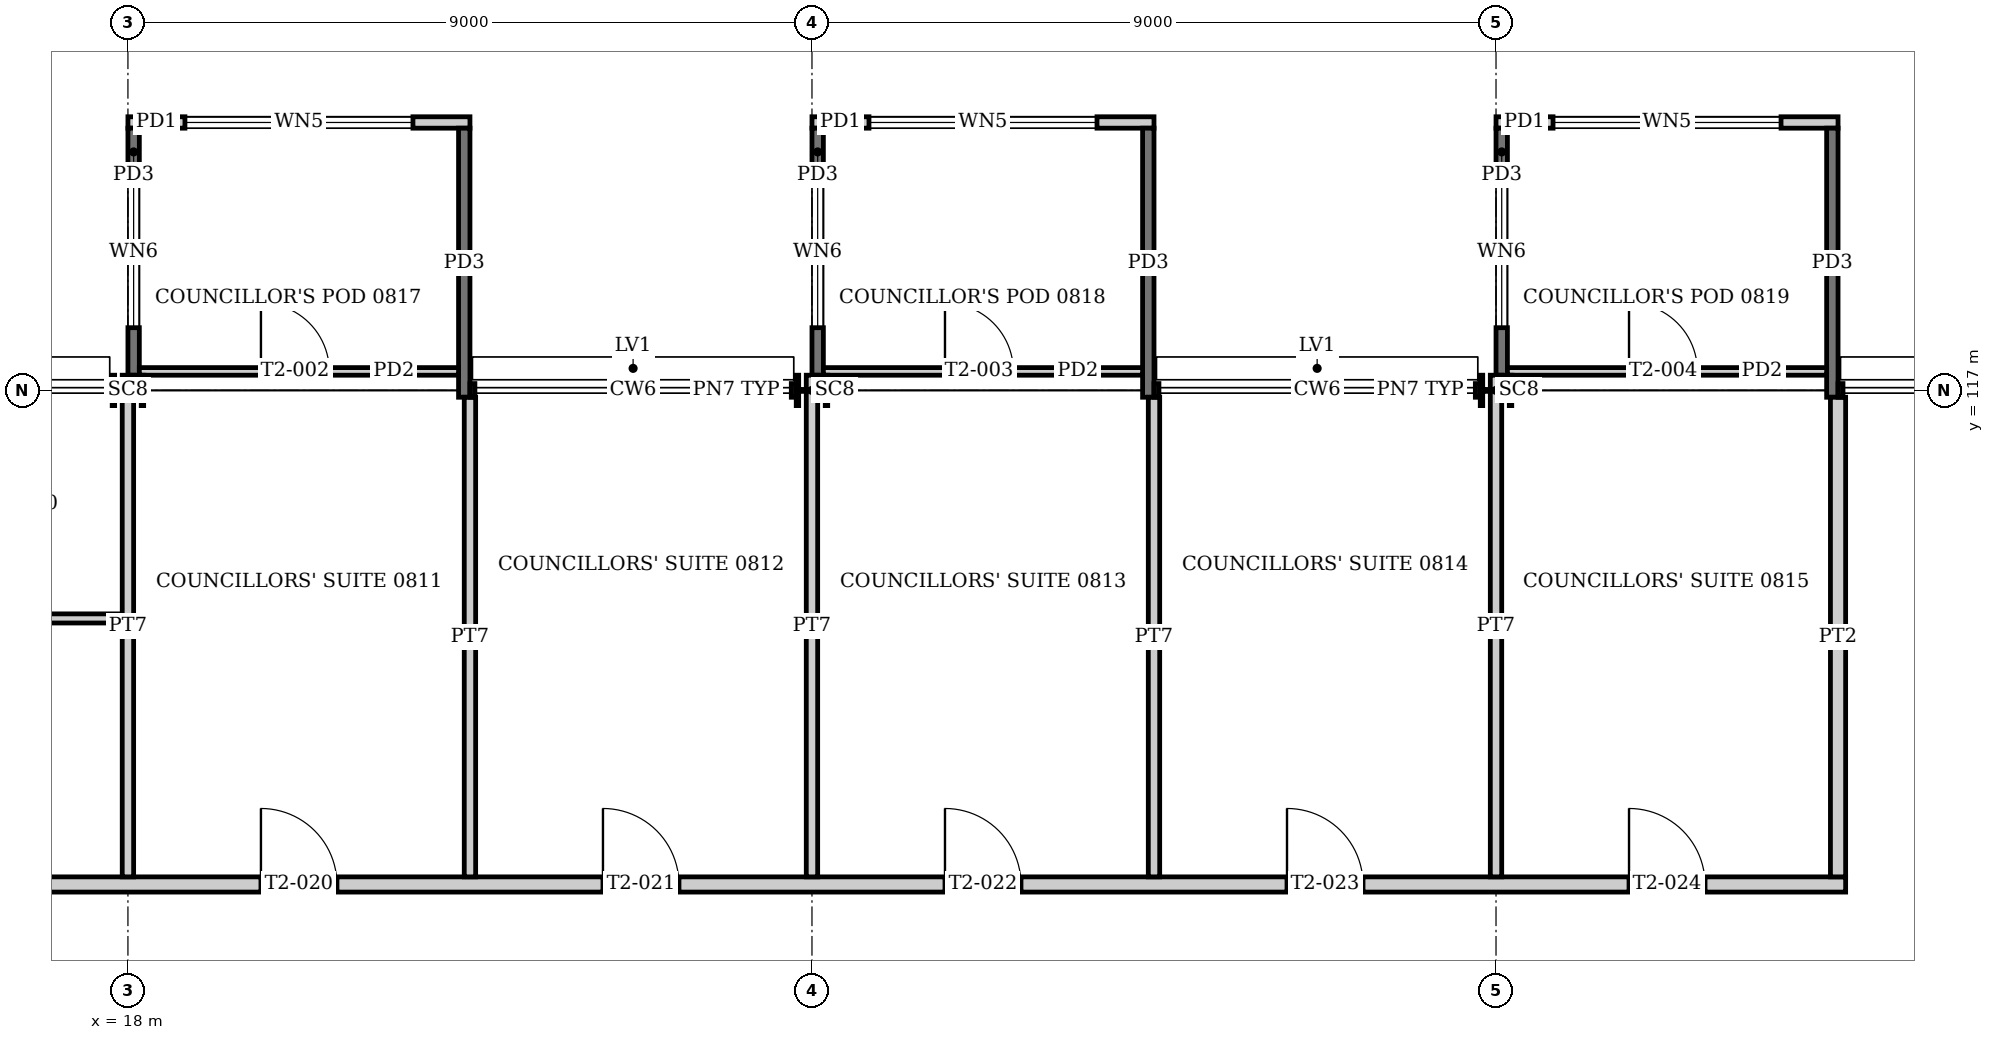
"""IFC4 building model, lengths in metres.
Left out: names, types, materials, properties, quantities, classifications, styles, units other than length and angle.
Written with IfcOpenShell. Run it as: python <this file> out.ifc"""

import sys

from ifc_helpers import new_model, si_unit, direction, frame, frame_2d, origin, origin_2d, place, context, subcontext, project, spatial, rectangle, i_section, extrude, element, fill, save


model = new_model("IFC4")
c1 = context("Model", 3, precision=1e-05, world=origin(), true_north=direction((0.0, 1.0)))
c2 = subcontext(c1, "Body", "Model", "MODEL_VIEW")
j1 = project(units=[si_unit("LENGTHUNIT", "METRE"), si_unit("PLANEANGLEUNIT", "RADIAN")], contexts=[c1])
p1 = place(None, origin())
s1 = spatial("IfcSite", under=j1, at=p1, CompositionType="ELEMENT")
p2 = place(p1, origin())
s2 = spatial("IfcBuilding", under=s1, at=p2, CompositionType="ELEMENT")
p3 = place(p2, frame((0.0, 0.0, 35.2)))
s3 = spatial("IfcBuildingStorey", under=s2, at=p3, CompositionType="ELEMENT", Elevation=35.2)
for number, where, z_axis, x_axis in (
    (1, (18.0, 117.0, 0.0), (0.0, 0.0, 1.0), (0.0, 1.0, 0.0)),
    (2, (27.0, 117.0, 0.0), (0.0, 0.0, 1.0), (0.0, 1.0, 0.0)),
    (3, (36.0, 117.0, 0.0), (0.0, 0.0, 1.0), (0.0, 1.0, 0.0)),
):
    element("IfcColumn", number, at=place(p3, frame(where, z_axis=z_axis, x_axis=x_axis)), inside=s3, PredefinedType="COLUMN", context=c2, shape_type="SweptSolid", body=[
        extrude(i_section(OverallWidth=0.4, OverallDepth=0.414, WebThickness=0.025, FlangeThickness=0.032, at=origin_2d()), origin(), (0.0, 0.0, 1.0), 4.0),
    ])
p4 = place(p3, frame((18.0, 120.525, 0.0), z_axis=(0.0, 0.0, 1.0), x_axis=(1.0, 0.0, 0.0)))
e4 = element("IfcWall", 4, at=p4, inside=s3, PredefinedType="SOLIDWALL", context=c2, shape_type="SweptSolid", body=[
    extrude(rectangle(XDim=4.5, YDim=0.15, at=frame_2d((2.25, 0.0))), origin(), (0.0, 0.0, 1.0), 2.6),
])
p5 = place(p4, frame((0.75, 0.0, 0.9)))
e5 = element("IfcOpeningElement", 5, at=p5, cuts=e4, PredefinedType="OPENING", context=c2, shape_type="SweptSolid", body=[
    extrude(rectangle(XDim=3.0, YDim=1.4, at=frame_2d((1.5, 0.7))), frame((0.0, 0.085, 0.0), z_axis=(0.0, -1.0, 0.0), x_axis=(1.0, 0.0, 0.0)), (0.0, 0.0, 1.0), 0.17),
])
p6 = place(p3, frame((18.075, 120.45, -0.15), z_axis=(0.0, 0.0, 1.0), x_axis=(0.0, -1.0, 0.0)))
e6 = element("IfcWall", 6, at=p6, inside=s3, PredefinedType="SOLIDWALL", context=c2, shape_type="SweptSolid", body=[
    extrude(rectangle(XDim=3.25, YDim=0.15, at=frame_2d((1.625, 0.0))), origin(), (0.0, 0.0, 1.0), 2.75),
])
p7 = place(p6, frame((0.625, 0.0, 1.05)))
e7 = element("IfcOpeningElement", 7, at=p7, cuts=e6, PredefinedType="OPENING", context=c2, shape_type="SweptSolid", body=[
    extrude(rectangle(XDim=2.0, YDim=1.4, at=frame_2d((1.0, 0.7))), frame((0.0, 0.085, 0.0), z_axis=(0.0, -1.0, 0.0), x_axis=(1.0, 0.0, 0.0)), (0.0, 0.0, 1.0), 0.17),
])
p8 = place(p3, frame((22.425, 120.45, -0.15), z_axis=(0.0, 0.0, 1.0), x_axis=(0.0, -1.0, 0.0)))
e8 = element("IfcWall", 8, at=p8, inside=s3, PredefinedType="SOLIDWALL", context=c2, shape_type="SweptSolid", body=[
    extrude(rectangle(XDim=3.54, YDim=0.15, at=frame_2d((1.77, 0.0))), origin(), (0.0, 0.0, 1.0), 2.75),
])
p9 = place(p3, frame((18.15, 117.25, 0.0), z_axis=(0.0, 0.0, 1.0), x_axis=(1.0, 0.0, 0.0)))
e9 = element("IfcWall", 9, at=p9, inside=s3, PredefinedType="PARTITIONING", context=c2, shape_type="SweptSolid", body=[
    extrude(rectangle(XDim=4.2, YDim=0.1, at=frame_2d((2.1, 0.0))), origin(), (0.0, 0.0, 1.0), 2.6),
])
p10 = place(p9, frame((1.6, 0.0, 0.0)))
e10 = element("IfcOpeningElement", 10, at=p10, cuts=e9, PredefinedType="OPENING", context=c2, shape_type="SweptSolid", body=[
    extrude(rectangle(XDim=0.9, YDim=2.1, at=frame_2d((0.45, 1.05))), frame((0.0, 0.06, 0.0), z_axis=(0.0, -1.0, 0.0), x_axis=(1.0, 0.0, 0.0)), (0.0, 0.0, 1.0), 0.12),
])
p11 = place(p3, frame((27.0, 120.525, 0.0), z_axis=(0.0, 0.0, 1.0), x_axis=(1.0, 0.0, 0.0)))
e11 = element("IfcWall", 11, at=p11, inside=s3, PredefinedType="SOLIDWALL", context=c2, shape_type="SweptSolid", body=[
    extrude(rectangle(XDim=4.5, YDim=0.15, at=frame_2d((2.25, 0.0))), origin(), (0.0, 0.0, 1.0), 2.6),
])
p12 = place(p11, frame((0.75, 0.0, 0.9)))
e12 = element("IfcOpeningElement", 12, at=p12, cuts=e11, PredefinedType="OPENING", context=c2, shape_type="SweptSolid", body=[
    extrude(rectangle(XDim=3.0, YDim=1.4, at=frame_2d((1.5, 0.7))), frame((0.0, 0.085, 0.0), z_axis=(0.0, -1.0, 0.0), x_axis=(1.0, 0.0, 0.0)), (0.0, 0.0, 1.0), 0.17),
])
p13 = place(p3, frame((27.075, 120.45, -0.15), z_axis=(0.0, 0.0, 1.0), x_axis=(0.0, -1.0, 0.0)))
e13 = element("IfcWall", 13, at=p13, inside=s3, PredefinedType="SOLIDWALL", context=c2, shape_type="SweptSolid", body=[
    extrude(rectangle(XDim=3.25, YDim=0.15, at=frame_2d((1.625, 0.0))), origin(), (0.0, 0.0, 1.0), 2.75),
])
p14 = place(p13, frame((0.625, 0.0, 1.05)))
e14 = element("IfcOpeningElement", 14, at=p14, cuts=e13, PredefinedType="OPENING", context=c2, shape_type="SweptSolid", body=[
    extrude(rectangle(XDim=2.0, YDim=1.4, at=frame_2d((1.0, 0.7))), frame((0.0, 0.085, 0.0), z_axis=(0.0, -1.0, 0.0), x_axis=(1.0, 0.0, 0.0)), (0.0, 0.0, 1.0), 0.17),
])
p15 = place(p3, frame((31.425, 120.45, -0.15), z_axis=(0.0, 0.0, 1.0), x_axis=(0.0, -1.0, 0.0)))
e15 = element("IfcWall", 15, at=p15, inside=s3, PredefinedType="SOLIDWALL", context=c2, shape_type="SweptSolid", body=[
    extrude(rectangle(XDim=3.54, YDim=0.15, at=frame_2d((1.77, 0.0))), origin(), (0.0, 0.0, 1.0), 2.75),
])
p16 = place(p3, frame((27.15, 117.25, 0.0), z_axis=(0.0, 0.0, 1.0), x_axis=(1.0, 0.0, 0.0)))
e16 = element("IfcWall", 16, at=p16, inside=s3, PredefinedType="PARTITIONING", context=c2, shape_type="SweptSolid", body=[
    extrude(rectangle(XDim=4.2, YDim=0.1, at=frame_2d((2.1, 0.0))), origin(), (0.0, 0.0, 1.0), 2.6),
])
p17 = place(p16, frame((1.6, 0.0, 0.0)))
e17 = element("IfcOpeningElement", 17, at=p17, cuts=e16, PredefinedType="OPENING", context=c2, shape_type="SweptSolid", body=[
    extrude(rectangle(XDim=0.9, YDim=2.1, at=frame_2d((0.45, 1.05))), frame((0.0, 0.06, 0.0), z_axis=(0.0, -1.0, 0.0), x_axis=(1.0, 0.0, 0.0)), (0.0, 0.0, 1.0), 0.12),
])
p18 = place(p3, frame((36.0, 120.525, 0.0), z_axis=(0.0, 0.0, 1.0), x_axis=(1.0, 0.0, 0.0)))
e18 = element("IfcWall", 18, at=p18, inside=s3, PredefinedType="SOLIDWALL", context=c2, shape_type="SweptSolid", body=[
    extrude(rectangle(XDim=4.5, YDim=0.15, at=frame_2d((2.25, 0.0))), origin(), (0.0, 0.0, 1.0), 2.6),
])
p19 = place(p18, frame((0.75, 0.0, 0.9)))
e19 = element("IfcOpeningElement", 19, at=p19, cuts=e18, PredefinedType="OPENING", context=c2, shape_type="SweptSolid", body=[
    extrude(rectangle(XDim=3.0, YDim=1.4, at=frame_2d((1.5, 0.7))), frame((0.0, 0.085, 0.0), z_axis=(0.0, -1.0, 0.0), x_axis=(1.0, 0.0, 0.0)), (0.0, 0.0, 1.0), 0.17),
])
p20 = place(p3, frame((36.075, 120.45, -0.15), z_axis=(0.0, 0.0, 1.0), x_axis=(0.0, -1.0, 0.0)))
e20 = element("IfcWall", 20, at=p20, inside=s3, PredefinedType="SOLIDWALL", context=c2, shape_type="SweptSolid", body=[
    extrude(rectangle(XDim=3.25, YDim=0.15, at=frame_2d((1.625, 0.0))), origin(), (0.0, 0.0, 1.0), 2.75),
])
p21 = place(p20, frame((0.625, 0.0, 1.05)))
e21 = element("IfcOpeningElement", 21, at=p21, cuts=e20, PredefinedType="OPENING", context=c2, shape_type="SweptSolid", body=[
    extrude(rectangle(XDim=2.0, YDim=1.4, at=frame_2d((1.0, 0.7))), frame((0.0, 0.085, 0.0), z_axis=(0.0, -1.0, 0.0), x_axis=(1.0, 0.0, 0.0)), (0.0, 0.0, 1.0), 0.17),
])
p22 = place(p3, frame((40.425, 120.45, -0.15), z_axis=(0.0, 0.0, 1.0), x_axis=(0.0, -1.0, 0.0)))
e22 = element("IfcWall", 22, at=p22, inside=s3, PredefinedType="SOLIDWALL", context=c2, shape_type="SweptSolid", body=[
    extrude(rectangle(XDim=3.54, YDim=0.15, at=frame_2d((1.77, 0.0))), origin(), (0.0, 0.0, 1.0), 2.75),
])
p23 = place(p3, frame((36.15, 117.25, 0.0), z_axis=(0.0, 0.0, 1.0), x_axis=(1.0, 0.0, 0.0)))
e23 = element("IfcWall", 23, at=p23, inside=s3, PredefinedType="PARTITIONING", context=c2, shape_type="SweptSolid", body=[
    extrude(rectangle(XDim=4.2, YDim=0.1, at=frame_2d((2.1, 0.0))), origin(), (0.0, 0.0, 1.0), 2.6),
])
p24 = place(p23, frame((1.6, 0.0, 0.0)))
e24 = element("IfcOpeningElement", 24, at=p24, cuts=e23, PredefinedType="OPENING", context=c2, shape_type="SweptSolid", body=[
    extrude(rectangle(XDim=0.9, YDim=2.1, at=frame_2d((0.45, 1.05))), frame((0.0, 0.06, 0.0), z_axis=(0.0, -1.0, 0.0), x_axis=(1.0, 0.0, 0.0)), (0.0, 0.0, 1.0), 0.12),
])
p25 = place(p3, frame((13.4, 110.5, 0.0), z_axis=(0.0, 0.0, 1.0), x_axis=(1.0, 0.0, 0.0)))
e25 = element("IfcWall", 25, at=p25, inside=s3, PredefinedType="PARTITIONING", context=c2, shape_type="SweptSolid", body=[
    extrude(rectangle(XDim=27.2, YDim=0.2, at=frame_2d((13.6, 0.0))), origin(), (0.0, 0.0, 1.0), 3.05),
])
p26 = place(p25, frame((6.35, 0.0, 0.0)))
e26 = element("IfcOpeningElement", 26, at=p26, cuts=e25, PredefinedType="OPENING", context=c2, shape_type="SweptSolid", body=[
    extrude(rectangle(XDim=1.0, YDim=2.1, at=frame_2d((0.5, 1.05))), frame((0.0, 0.11, 0.0), z_axis=(0.0, -1.0, 0.0), x_axis=(1.0, 0.0, 0.0)), (0.0, 0.0, 1.0), 0.22),
])
p27 = place(p25, frame((10.85, 0.0, 0.0)))
e27 = element("IfcOpeningElement", 27, at=p27, cuts=e25, PredefinedType="OPENING", context=c2, shape_type="SweptSolid", body=[
    extrude(rectangle(XDim=1.0, YDim=2.1, at=frame_2d((0.5, 1.05))), frame((0.0, 0.11, 0.0), z_axis=(0.0, -1.0, 0.0), x_axis=(1.0, 0.0, 0.0)), (0.0, 0.0, 1.0), 0.22),
])
p28 = place(p25, frame((15.35, 0.0, 0.0)))
e28 = element("IfcOpeningElement", 28, at=p28, cuts=e25, PredefinedType="OPENING", context=c2, shape_type="SweptSolid", body=[
    extrude(rectangle(XDim=1.0, YDim=2.1, at=frame_2d((0.5, 1.05))), frame((0.0, 0.11, 0.0), z_axis=(0.0, -1.0, 0.0), x_axis=(1.0, 0.0, 0.0)), (0.0, 0.0, 1.0), 0.22),
])
p29 = place(p25, frame((19.85, 0.0, 0.0)))
e29 = element("IfcOpeningElement", 29, at=p29, cuts=e25, PredefinedType="OPENING", context=c2, shape_type="SweptSolid", body=[
    extrude(rectangle(XDim=1.0, YDim=2.1, at=frame_2d((0.5, 1.05))), frame((0.0, 0.11, 0.0), z_axis=(0.0, -1.0, 0.0), x_axis=(1.0, 0.0, 0.0)), (0.0, 0.0, 1.0), 0.22),
])
p30 = place(p25, frame((24.35, 0.0, 0.0)))
e30 = element("IfcOpeningElement", 30, at=p30, cuts=e25, PredefinedType="OPENING", context=c2, shape_type="SweptSolid", body=[
    extrude(rectangle(XDim=1.0, YDim=2.1, at=frame_2d((0.5, 1.05))), frame((0.0, 0.11, 0.0), z_axis=(0.0, -1.0, 0.0), x_axis=(1.0, 0.0, 0.0)), (0.0, 0.0, 1.0), 0.22),
])
p31 = place(p3, frame((13.6, 114.0, 0.0), z_axis=(0.0, 0.0, 1.0), x_axis=(1.0, 0.0, 0.0)))
e31 = element("IfcWall", 31, at=p31, inside=s3, PredefinedType="PARTITIONING", context=c2, shape_type="SweptSolid", body=[
    extrude(rectangle(XDim=4.325, YDim=0.12, at=frame_2d((2.163, 0.0))), origin(), (0.0, 0.0, 1.0), 3.05),
])
p32 = place(p3, frame((18.0, 110.6, 0.0), z_axis=(0.0, 0.0, 1.0), x_axis=(0.0, 1.0, 0.0)))
e32 = element("IfcWall", 32, at=p32, inside=s3, PredefinedType="PARTITIONING", context=c2, shape_type="SweptSolid", body=[
    extrude(rectangle(XDim=6.6, YDim=0.15, at=frame_2d((3.3, 0.0))), origin(), (0.0, 0.0, 1.0), 3.05),
])
p33 = place(p3, frame((22.5, 110.6, 0.0), z_axis=(0.0, 0.0, 1.0), x_axis=(0.0, 1.0, 0.0)))
e33 = element("IfcWall", 33, at=p33, inside=s3, PredefinedType="PARTITIONING", context=c2, shape_type="SweptSolid", body=[
    extrude(rectangle(XDim=6.31, YDim=0.15, at=frame_2d((3.155, 0.0))), origin(), (0.0, 0.0, 1.0), 3.05),
])
p34 = place(p3, frame((27.0, 110.6, 0.0), z_axis=(0.0, 0.0, 1.0), x_axis=(0.0, 1.0, 0.0)))
e34 = element("IfcWall", 34, at=p34, inside=s3, PredefinedType="PARTITIONING", context=c2, shape_type="SweptSolid", body=[
    extrude(rectangle(XDim=6.6, YDim=0.15, at=frame_2d((3.3, 0.0))), origin(), (0.0, 0.0, 1.0), 3.05),
])
p35 = place(p3, frame((31.5, 110.6, 0.0), z_axis=(0.0, 0.0, 1.0), x_axis=(0.0, 1.0, 0.0)))
e35 = element("IfcWall", 35, at=p35, inside=s3, PredefinedType="PARTITIONING", context=c2, shape_type="SweptSolid", body=[
    extrude(rectangle(XDim=6.31, YDim=0.15, at=frame_2d((3.155, 0.0))), origin(), (0.0, 0.0, 1.0), 3.05),
])
p36 = place(p3, frame((36.0, 110.6, 0.0), z_axis=(0.0, 0.0, 1.0), x_axis=(0.0, 1.0, 0.0)))
e36 = element("IfcWall", 36, at=p36, inside=s3, PredefinedType="PARTITIONING", context=c2, shape_type="SweptSolid", body=[
    extrude(rectangle(XDim=6.6, YDim=0.15, at=frame_2d((3.3, 0.0))), origin(), (0.0, 0.0, 1.0), 3.05),
])
p37 = place(p3, frame((40.5, 110.6, 0.0), z_axis=(0.0, 0.0, 1.0), x_axis=(0.0, 1.0, 0.0)))
e37 = element("IfcWall", 37, at=p37, inside=s3, PredefinedType="PARTITIONING", context=c2, shape_type="SweptSolid", body=[
    extrude(rectangle(XDim=6.31, YDim=0.2, at=frame_2d((3.155, 0.0))), origin(), (0.0, 0.0, 1.0), 3.05),
])
p38 = place(p5, origin())
e38 = element("IfcWindow", 38, at=p38, inside=s3, PartitioningType="SINGLE_PANEL", PredefinedType="WINDOW", context=c2, shape_type="SweptSolid", body=[
    extrude(rectangle(XDim=3.0, YDim=1.4, at=frame_2d((1.5, 0.7))), frame((0.0, 0.03, 0.0), z_axis=(0.0, -1.0, 0.0), x_axis=(1.0, 0.0, 0.0)), (0.0, 0.0, 1.0), 0.06),
])
fill(e5, e38)
p39 = place(p7, origin())
e39 = element("IfcWindow", 39, at=p39, inside=s3, PartitioningType="SINGLE_PANEL", PredefinedType="WINDOW", context=c2, shape_type="SweptSolid", body=[
    extrude(rectangle(XDim=2.0, YDim=1.4, at=frame_2d((1.0, 0.7))), frame((0.0, 0.03, 0.0), z_axis=(0.0, -1.0, 0.0), x_axis=(1.0, 0.0, 0.0)), (0.0, 0.0, 1.0), 0.06),
])
fill(e7, e39)
p40 = place(p10, origin())
e40 = element("IfcDoor", 40, at=p40, inside=s3, OperationType="SINGLE_SWING_LEFT", PredefinedType="DOOR", context=c2, shape_type="SweptSolid", body=[
    extrude(rectangle(XDim=0.9, YDim=2.1, at=frame_2d((0.45, 1.05))), frame((0.0, 0.025, 0.0), z_axis=(0.0, -1.0, 0.0), x_axis=(1.0, 0.0, 0.0)), (0.0, 0.0, 1.0), 0.05),
])
fill(e10, e40)
p41 = place(p12, origin())
e41 = element("IfcWindow", 41, at=p41, inside=s3, PartitioningType="SINGLE_PANEL", PredefinedType="WINDOW", context=c2, shape_type="SweptSolid", body=[
    extrude(rectangle(XDim=3.0, YDim=1.4, at=frame_2d((1.5, 0.7))), frame((0.0, 0.03, 0.0), z_axis=(0.0, -1.0, 0.0), x_axis=(1.0, 0.0, 0.0)), (0.0, 0.0, 1.0), 0.06),
])
fill(e12, e41)
p42 = place(p14, origin())
e42 = element("IfcWindow", 42, at=p42, inside=s3, PartitioningType="SINGLE_PANEL", PredefinedType="WINDOW", context=c2, shape_type="SweptSolid", body=[
    extrude(rectangle(XDim=2.0, YDim=1.4, at=frame_2d((1.0, 0.7))), frame((0.0, 0.03, 0.0), z_axis=(0.0, -1.0, 0.0), x_axis=(1.0, 0.0, 0.0)), (0.0, 0.0, 1.0), 0.06),
])
fill(e14, e42)
p43 = place(p17, origin())
e43 = element("IfcDoor", 43, at=p43, inside=s3, OperationType="SINGLE_SWING_LEFT", PredefinedType="DOOR", context=c2, shape_type="SweptSolid", body=[
    extrude(rectangle(XDim=0.9, YDim=2.1, at=frame_2d((0.45, 1.05))), frame((0.0, 0.025, 0.0), z_axis=(0.0, -1.0, 0.0), x_axis=(1.0, 0.0, 0.0)), (0.0, 0.0, 1.0), 0.05),
])
fill(e17, e43)
p44 = place(p19, origin())
e44 = element("IfcWindow", 44, at=p44, inside=s3, PartitioningType="SINGLE_PANEL", PredefinedType="WINDOW", context=c2, shape_type="SweptSolid", body=[
    extrude(rectangle(XDim=3.0, YDim=1.4, at=frame_2d((1.5, 0.7))), frame((0.0, 0.03, 0.0), z_axis=(0.0, -1.0, 0.0), x_axis=(1.0, 0.0, 0.0)), (0.0, 0.0, 1.0), 0.06),
])
fill(e19, e44)
p45 = place(p21, origin())
e45 = element("IfcWindow", 45, at=p45, inside=s3, PartitioningType="SINGLE_PANEL", PredefinedType="WINDOW", context=c2, shape_type="SweptSolid", body=[
    extrude(rectangle(XDim=2.0, YDim=1.4, at=frame_2d((1.0, 0.7))), frame((0.0, 0.03, 0.0), z_axis=(0.0, -1.0, 0.0), x_axis=(1.0, 0.0, 0.0)), (0.0, 0.0, 1.0), 0.06),
])
fill(e21, e45)
p46 = place(p24, origin())
e46 = element("IfcDoor", 46, at=p46, inside=s3, OperationType="SINGLE_SWING_LEFT", PredefinedType="DOOR", context=c2, shape_type="SweptSolid", body=[
    extrude(rectangle(XDim=0.9, YDim=2.1, at=frame_2d((0.45, 1.05))), frame((0.0, 0.025, 0.0), z_axis=(0.0, -1.0, 0.0), x_axis=(1.0, 0.0, 0.0)), (0.0, 0.0, 1.0), 0.05),
])
fill(e24, e46)
p47 = place(p26, origin())
e47 = element("IfcDoor", 47, at=p47, inside=s3, OperationType="SINGLE_SWING_LEFT", PredefinedType="DOOR", context=c2, shape_type="SweptSolid", body=[
    extrude(rectangle(XDim=1.0, YDim=2.1, at=frame_2d((0.5, 1.05))), frame((0.0, 0.025, 0.0), z_axis=(0.0, -1.0, 0.0), x_axis=(1.0, 0.0, 0.0)), (0.0, 0.0, 1.0), 0.05),
])
fill(e26, e47)
p48 = place(p27, origin())
e48 = element("IfcDoor", 48, at=p48, inside=s3, OperationType="SINGLE_SWING_LEFT", PredefinedType="DOOR", context=c2, shape_type="SweptSolid", body=[
    extrude(rectangle(XDim=1.0, YDim=2.1, at=frame_2d((0.5, 1.05))), frame((0.0, 0.025, 0.0), z_axis=(0.0, -1.0, 0.0), x_axis=(1.0, 0.0, 0.0)), (0.0, 0.0, 1.0), 0.05),
])
fill(e27, e48)
p49 = place(p28, origin())
e49 = element("IfcDoor", 49, at=p49, inside=s3, OperationType="SINGLE_SWING_LEFT", PredefinedType="DOOR", context=c2, shape_type="SweptSolid", body=[
    extrude(rectangle(XDim=1.0, YDim=2.1, at=frame_2d((0.5, 1.05))), frame((0.0, 0.025, 0.0), z_axis=(0.0, -1.0, 0.0), x_axis=(1.0, 0.0, 0.0)), (0.0, 0.0, 1.0), 0.05),
])
fill(e28, e49)
p50 = place(p29, origin())
e50 = element("IfcDoor", 50, at=p50, inside=s3, OperationType="SINGLE_SWING_LEFT", PredefinedType="DOOR", context=c2, shape_type="SweptSolid", body=[
    extrude(rectangle(XDim=1.0, YDim=2.1, at=frame_2d((0.5, 1.05))), frame((0.0, 0.025, 0.0), z_axis=(0.0, -1.0, 0.0), x_axis=(1.0, 0.0, 0.0)), (0.0, 0.0, 1.0), 0.05),
])
fill(e29, e50)
p51 = place(p30, origin())
e51 = element("IfcDoor", 51, at=p51, inside=s3, OperationType="SINGLE_SWING_LEFT", PredefinedType="DOOR", context=c2, shape_type="SweptSolid", body=[
    extrude(rectangle(XDim=1.0, YDim=2.1, at=frame_2d((0.5, 1.05))), frame((0.0, 0.025, 0.0), z_axis=(0.0, -1.0, 0.0), x_axis=(1.0, 0.0, 0.0)), (0.0, 0.0, 1.0), 0.05),
])
fill(e30, e51)
save(model, sys.argv[1])
